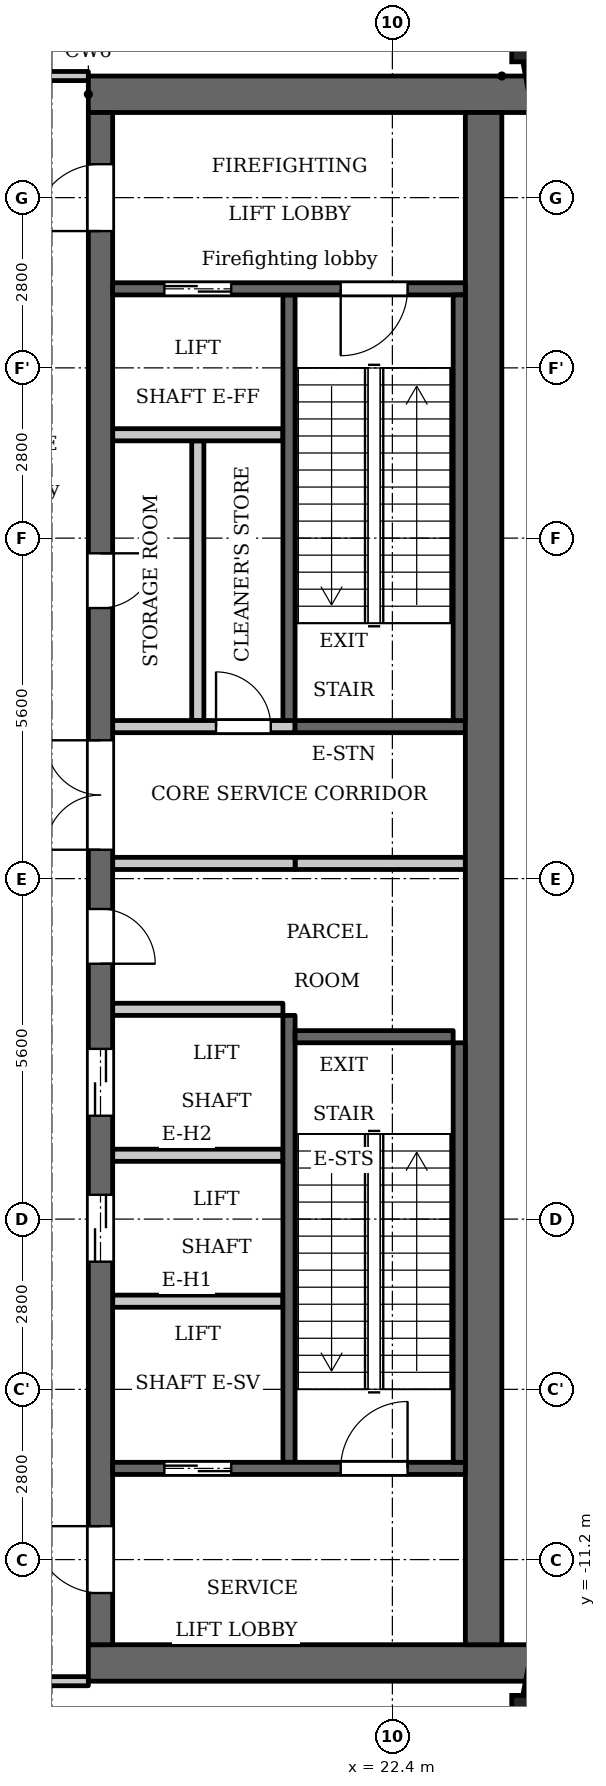
"""IFC4 building model, lengths in metres.
Left out: names, types, materials, properties, quantities, classifications, styles, units other than length and angle.
Written with IfcOpenShell. Run it as: python <this file> out.ifc"""

import sys

from ifc_helpers import new_model, si_unit, direction, frame, frame_2d, origin, origin_2d, place, context, subcontext, project, spatial, rectangle, extrude, element, fill, save


model = new_model("IFC4")
c1 = context("Model", 3, precision=1e-05, world=origin(), true_north=direction((0.0, 1.0)))
c2 = subcontext(c1, "Body", "Model", "MODEL_VIEW")
j1 = project(units=[si_unit("LENGTHUNIT", "METRE"), si_unit("PLANEANGLEUNIT", "RADIAN")], contexts=[c1])
p1 = place(None, origin())
s1 = spatial("IfcSite", under=j1, at=p1, CompositionType="ELEMENT")
p2 = place(p1, origin())
s2 = spatial("IfcBuilding", under=s1, at=p2, CompositionType="ELEMENT")
p3 = place(p2, frame((0.0, 0.0, 289.1)))
s3 = spatial("IfcBuildingStorey", under=s2, at=p3, CompositionType="ELEMENT", Elevation=289.1)
for number, where, z_axis, x_axis in (
    (1, (24.738, -13.809, 0.0), (0.0, 0.0, 1.0), (1.0, 0.0, 0.0)),
    (2, (24.738, 13.809, 0.0), (0.0, 0.0, 1.0), (1.0, 0.0, 0.0)),
):
    element("IfcColumn", number, at=place(p3, frame(where, z_axis=z_axis, x_axis=x_axis)), inside=s3, PredefinedType="COLUMN", context=c2, shape_type="SweptSolid", body=[
        extrude(rectangle(XDim=0.75, YDim=0.75, at=origin_2d()), origin(), (0.0, 0.0, 1.0), 5.4),
    ])
for number, where, z_axis, x_axis in (
    (3, (24.7, -13.42, 0.0), (0.0, 0.0, 1.0), (0.187, 0.982, 0.0)),
    (4, (25.053, 11.572, 0.0), (0.0, 0.0, 1.0), (-0.187, 0.982, 0.0)),
):
    element("IfcWall", number, at=place(p3, frame(where, z_axis=z_axis, x_axis=x_axis)), inside=s3, PredefinedType="SOLIDWALL", context=c2, shape_type="SweptSolid", body=[
        extrude(rectangle(XDim=1.881, YDim=0.3, at=frame_2d((0.941, 0.0))), origin(), (0.0, 0.0, 1.0), 3.2),
    ])
p4 = place(p3, frame((20.7, 2.6, 0.0), z_axis=(0.0, 0.0, 1.0), x_axis=(0.0, 1.0, 0.0)))
e5 = element("IfcWall", 5, at=p4, inside=s3, PredefinedType="SHEAR", context=c2, shape_type="SweptSolid", body=[
    extrude(rectangle(XDim=7.0, YDim=0.2, at=frame_2d((3.5, 0.0))), origin(), (0.0, 0.0, 1.0), 5.0),
])
p5 = place(p3, frame((20.7, -9.6, 0.0), z_axis=(0.0, 0.0, 1.0), x_axis=(0.0, 1.0, 0.0)))
e6 = element("IfcWall", 6, at=p5, inside=s3, PredefinedType="SHEAR", context=c2, shape_type="SweptSolid", body=[
    extrude(rectangle(XDim=7.35, YDim=0.2, at=frame_2d((3.675, 0.0))), origin(), (0.0, 0.0, 1.0), 5.0),
])
p6 = place(p3, frame((20.8, 2.5, 0.0), z_axis=(0.0, 0.0, 1.0), x_axis=(1.0, 0.0, 0.0)))
e7 = element("IfcWall", 7, at=p6, inside=s3, PredefinedType="SHEAR", context=c2, shape_type="SweptSolid", body=[
    extrude(rectangle(XDim=2.8, YDim=0.2, at=frame_2d((1.4, 0.0))), origin(), (0.0, 0.0, 1.0), 5.0),
])
p7 = place(p3, frame((20.8, 0.25, 0.0), z_axis=(0.0, 0.0, 1.0), x_axis=(1.0, 0.0, 0.0)))
e8 = element("IfcWall", 8, at=p7, inside=s3, PredefinedType="PARTITIONING", context=c2, shape_type="SweptSolid", body=[
    extrude(rectangle(XDim=2.8, YDim=0.2, at=frame_2d((1.4, 0.0))), origin(), (0.0, 0.0, 1.0), 5.0),
])
for number, where, z_axis, x_axis in (
    (9, (17.4, 12.9, 0.0), (0.0, 0.0, 1.0), (1.0, 0.0, 0.0)),
    (10, (17.4, -12.9, 0.0), (0.0, 0.0, 1.0), (1.0, 0.0, 0.0)),
):
    element("IfcWall", number, at=place(p3, frame(where, z_axis=z_axis, x_axis=x_axis)), inside=s3, PredefinedType="SHEAR", context=c2, shape_type="SweptSolid", body=[
        extrude(rectangle(XDim=7.32, YDim=0.6, at=frame_2d((3.66, 0.0))), origin(), (0.0, 0.0, 1.0), 5.0),
    ])
p8 = place(p3, frame((19.2, 2.6, 0.0), z_axis=(0.0, 0.0, 1.0), x_axis=(0.0, 1.0, 0.0)))
e11 = element("IfcWall", 11, at=p8, inside=s3, PredefinedType="PARTITIONING", context=c2, shape_type="SweptSolid", body=[
    extrude(rectangle(XDim=4.6, YDim=0.2, at=frame_2d((2.3, 0.0))), origin(), (0.0, 0.0, 1.0), 5.0),
])
p9 = place(p3, frame((17.6, -12.6, 0.0), z_axis=(0.0, 0.0, 1.0), x_axis=(0.0, 1.0, 0.0)))
e12 = element("IfcWall", 12, at=p9, inside=s3, PredefinedType="SHEAR", context=c2, shape_type="SweptSolid", body=[
    extrude(rectangle(XDim=25.2, YDim=0.4, at=frame_2d((12.6, 0.0))), origin(), (0.0, 0.0, 1.0), 5.0),
])
p10 = place(p9, frame((6.3, 0.0, 0.0)))
e13 = element("IfcOpeningElement", 13, at=p10, cuts=e12, PredefinedType="OPENING", context=c2, shape_type="SweptSolid", body=[
    extrude(rectangle(XDim=1.1, YDim=2.1, at=frame_2d((0.55, 1.05))), frame((0.0, 0.21, 0.0), z_axis=(0.0, -1.0, 0.0), x_axis=(1.0, 0.0, 0.0)), (0.0, 0.0, 1.0), 0.42),
])
p11 = place(p9, frame((8.7, 0.0, 0.0)))
e14 = element("IfcOpeningElement", 14, at=p11, cuts=e12, PredefinedType="OPENING", context=c2, shape_type="SweptSolid", body=[
    extrude(rectangle(XDim=1.1, YDim=2.1, at=frame_2d((0.55, 1.05))), frame((0.0, 0.21, 0.0), z_axis=(0.0, -1.0, 0.0), x_axis=(1.0, 0.0, 0.0)), (0.0, 0.0, 1.0), 0.42),
])
p12 = place(p9, frame((11.2, 0.0, 0.0)))
e15 = element("IfcOpeningElement", 15, at=p12, cuts=e12, PredefinedType="OPENING", context=c2, shape_type="SweptSolid", body=[
    extrude(rectangle(XDim=0.9, YDim=2.1, at=frame_2d((0.45, 1.05))), frame((0.0, 0.21, 0.0), z_axis=(0.0, -1.0, 0.0), x_axis=(1.0, 0.0, 0.0)), (0.0, 0.0, 1.0), 0.42),
])
p13 = place(p9, frame((17.05, 0.0, 0.0)))
e16 = element("IfcOpeningElement", 16, at=p13, cuts=e12, PredefinedType="OPENING", context=c2, shape_type="SweptSolid", body=[
    extrude(rectangle(XDim=0.9, YDim=2.1, at=frame_2d((0.45, 1.05))), frame((0.0, 0.21, 0.0), z_axis=(0.0, -1.0, 0.0), x_axis=(1.0, 0.0, 0.0)), (0.0, 0.0, 1.0), 0.42),
])
p14 = place(p9, frame((23.25, 0.0, 0.0)))
e17 = element("IfcOpeningElement", 17, at=p14, cuts=e12, PredefinedType="OPENING", context=c2, shape_type="SweptSolid", body=[
    extrude(rectangle(XDim=1.1, YDim=2.1, at=frame_2d((0.55, 1.05))), frame((0.0, 0.21, 0.0), z_axis=(0.0, -1.0, 0.0), x_axis=(1.0, 0.0, 0.0)), (0.0, 0.0, 1.0), 0.42),
])
p15 = place(p9, frame((0.85, 0.0, 0.0)))
e18 = element("IfcOpeningElement", 18, at=p15, cuts=e12, PredefinedType="OPENING", context=c2, shape_type="SweptSolid", body=[
    extrude(rectangle(XDim=1.1, YDim=2.1, at=frame_2d((0.55, 1.05))), frame((0.0, 0.21, 0.0), z_axis=(0.0, -1.0, 0.0), x_axis=(1.0, 0.0, 0.0)), (0.0, 0.0, 1.0), 0.42),
])
p16 = place(p9, frame((13.075, 0.0, 0.0)))
e19 = element("IfcOpeningElement", 19, at=p16, cuts=e12, PredefinedType="OPENING", context=c2, shape_type="SweptSolid", body=[
    extrude(rectangle(XDim=1.8, YDim=2.1, at=frame_2d((0.9, 1.05))), frame((0.0, 0.21, 0.0), z_axis=(0.0, -1.0, 0.0), x_axis=(1.0, 0.0, 0.0)), (0.0, 0.0, 1.0), 0.42),
])
p17 = place(p3, frame((23.9, -12.6, 0.0), z_axis=(0.0, 0.0, 1.0), x_axis=(0.0, 1.0, 0.0)))
e20 = element("IfcWall", 20, at=p17, inside=s3, PredefinedType="SHEAR", context=c2, shape_type="SweptSolid", body=[
    extrude(rectangle(XDim=25.2, YDim=0.6, at=frame_2d((12.6, 0.0))), origin(), (0.0, 0.0, 1.0), 5.0),
])
p18 = place(p3, frame((17.8, -9.7, 0.0), z_axis=(0.0, 0.0, 1.0), x_axis=(1.0, 0.0, 0.0)))
e21 = element("IfcWall", 21, at=p18, inside=s3, PredefinedType="SHEAR", context=c2, shape_type="SweptSolid", body=[
    extrude(rectangle(XDim=5.8, YDim=0.2, at=frame_2d((2.9, 0.0))), origin(), (0.0, 0.0, 1.0), 5.0),
])
p19 = place(p18, frame((0.85, 0.0, 0.0)))
e22 = element("IfcOpeningElement", 22, at=p19, cuts=e21, PredefinedType="OPENING", context=c2, shape_type="SweptSolid", body=[
    extrude(rectangle(XDim=1.1, YDim=2.1, at=frame_2d((0.55, 1.05))), frame((0.0, 0.11, 0.0), z_axis=(0.0, -1.0, 0.0), x_axis=(1.0, 0.0, 0.0)), (0.0, 0.0, 1.0), 0.22),
])
p20 = place(p18, frame((3.75, 0.0, 0.0)))
e23 = element("IfcOpeningElement", 23, at=p20, cuts=e21, PredefinedType="OPENING", context=c2, shape_type="SweptSolid", body=[
    extrude(rectangle(XDim=1.1, YDim=2.1, at=frame_2d((0.55, 1.05))), frame((0.0, 0.11, 0.0), z_axis=(0.0, -1.0, 0.0), x_axis=(1.0, 0.0, 0.0)), (0.0, 0.0, 1.0), 0.22),
])
for number, where, z_axis, x_axis in (
    (24, (17.8, -6.95, 0.0), (0.0, 0.0, 1.0), (1.0, 0.0, 0.0)),
    (25, (17.8, -4.55, 0.0), (0.0, 0.0, 1.0), (1.0, 0.0, 0.0)),
    (26, (17.8, -2.15, 0.0), (0.0, 0.0, 1.0), (1.0, 0.0, 0.0)),
):
    element("IfcWall", number, at=place(p3, frame(where, z_axis=z_axis, x_axis=x_axis)), inside=s3, PredefinedType="PARTITIONING", context=c2, shape_type="SweptSolid", body=[
        extrude(rectangle(XDim=2.8, YDim=0.2, at=frame_2d((1.4, 0.0))), origin(), (0.0, 0.0, 1.0), 5.0),
    ])
p21 = place(p3, frame((17.8, 0.25, 0.0), z_axis=(0.0, 0.0, 1.0), x_axis=(1.0, 0.0, 0.0)))
e27 = element("IfcWall", 27, at=p21, inside=s3, PredefinedType="PARTITIONING", context=c2, shape_type="SweptSolid", body=[
    extrude(rectangle(XDim=3.0, YDim=0.2, at=frame_2d((1.5, 0.0))), origin(), (0.0, 0.0, 1.0), 5.0),
])
p22 = place(p3, frame((17.8, 2.5, 0.0), z_axis=(0.0, 0.0, 1.0), x_axis=(1.0, 0.0, 0.0)))
e28 = element("IfcWall", 28, at=p22, inside=s3, PredefinedType="PARTITIONING", context=c2, shape_type="SweptSolid", body=[
    extrude(rectangle(XDim=3.0, YDim=0.2, at=frame_2d((1.5, 0.0))), origin(), (0.0, 0.0, 1.0), 5.0),
])
p23 = place(p22, frame((1.7, 0.0, 0.0)))
e29 = element("IfcOpeningElement", 29, at=p23, cuts=e28, PredefinedType="OPENING", context=c2, shape_type="SweptSolid", body=[
    extrude(rectangle(XDim=0.9, YDim=2.1, at=frame_2d((0.45, 1.05))), frame((0.0, 0.11, 0.0), z_axis=(0.0, -1.0, 0.0), x_axis=(1.0, 0.0, 0.0)), (0.0, 0.0, 1.0), 0.22),
])
p24 = place(p3, frame((17.8, 7.3, 0.0), z_axis=(0.0, 0.0, 1.0), x_axis=(1.0, 0.0, 0.0)))
e30 = element("IfcWall", 30, at=p24, inside=s3, PredefinedType="PARTITIONING", context=c2, shape_type="SweptSolid", body=[
    extrude(rectangle(XDim=2.8, YDim=0.2, at=frame_2d((1.4, 0.0))), origin(), (0.0, 0.0, 1.0), 5.0),
])
p25 = place(p3, frame((17.8, 9.7, 0.0), z_axis=(0.0, 0.0, 1.0), x_axis=(1.0, 0.0, 0.0)))
e31 = element("IfcWall", 31, at=p25, inside=s3, PredefinedType="SHEAR", context=c2, shape_type="SweptSolid", body=[
    extrude(rectangle(XDim=5.8, YDim=0.2, at=frame_2d((2.9, 0.0))), origin(), (0.0, 0.0, 1.0), 5.0),
])
p26 = place(p25, frame((0.85, 0.0, 0.0)))
e32 = element("IfcOpeningElement", 32, at=p26, cuts=e31, PredefinedType="OPENING", context=c2, shape_type="SweptSolid", body=[
    extrude(rectangle(XDim=1.1, YDim=2.1, at=frame_2d((0.55, 1.05))), frame((0.0, 0.11, 0.0), z_axis=(0.0, -1.0, 0.0), x_axis=(1.0, 0.0, 0.0)), (0.0, 0.0, 1.0), 0.22),
])
p27 = place(p25, frame((3.75, 0.0, 0.0)))
e33 = element("IfcOpeningElement", 33, at=p27, cuts=e31, PredefinedType="OPENING", context=c2, shape_type="SweptSolid", body=[
    extrude(rectangle(XDim=1.1, YDim=2.1, at=frame_2d((0.55, 1.05))), frame((0.0, 0.11, 0.0), z_axis=(0.0, -1.0, 0.0), x_axis=(1.0, 0.0, 0.0)), (0.0, 0.0, 1.0), 0.22),
])
p28 = place(p3, frame((23.5, 2.6, 0.0), z_axis=(0.0, 0.0, 1.0), x_axis=(0.0, 1.0, 0.0)))
e34 = element("IfcWall", 34, at=p28, inside=s3, PredefinedType="SHEAR", context=c2, shape_type="SweptSolid", body=[
    extrude(rectangle(XDim=7.0, YDim=0.2, at=frame_2d((3.5, 0.0))), origin(), (0.0, 0.0, 1.0), 5.0),
])
p29 = place(p3, frame((23.5, -9.6, 0.0), z_axis=(0.0, 0.0, 1.0), x_axis=(0.0, 1.0, 0.0)))
e35 = element("IfcWall", 35, at=p29, inside=s3, PredefinedType="SHEAR", context=c2, shape_type="SweptSolid", body=[
    extrude(rectangle(XDim=6.9, YDim=0.2, at=frame_2d((3.45, 0.0))), origin(), (0.0, 0.0, 1.0), 5.0),
])
p30 = place(p3, frame((20.8, -2.6, 0.0), z_axis=(0.0, 0.0, 1.0), x_axis=(1.0, 0.0, 0.0)))
e36 = element("IfcWall", 36, at=p30, inside=s3, PredefinedType="SHEAR", context=c2, shape_type="SweptSolid", body=[
    extrude(rectangle(XDim=2.6, YDim=0.2, at=frame_2d((1.3, 0.0))), origin(), (0.0, 0.0, 1.0), 5.0),
])
p31 = place(p3, frame((-17.4, -13.2, 0.0), z_axis=(0.0, 0.0, 1.0), x_axis=(1.0, 0.0, 0.0)))
e37 = element("IfcWall", 37, at=p31, inside=s3, PredefinedType="PARTITIONING", context=c2, shape_type="SweptSolid", body=[
    extrude(rectangle(XDim=34.8, YDim=0.15, at=frame_2d((17.4, 0.0))), origin(), (0.0, 0.0, 1.0), 5.0),
])
p32 = place(p31, frame((0.65, 0.0, 0.0)))
e38 = element("IfcOpeningElement", 38, at=p32, cuts=e37, PredefinedType="OPENING", context=c2, shape_type="SweptSolid", body=[
    extrude(rectangle(XDim=1.0, YDim=2.1, at=frame_2d((0.5, 1.05))), frame((0.0, 0.085, 0.0), z_axis=(0.0, -1.0, 0.0), x_axis=(1.0, 0.0, 0.0)), (0.0, 0.0, 1.0), 0.17),
])
p33 = place(p31, frame((33.05, 0.0, 0.0)))
e39 = element("IfcOpeningElement", 39, at=p33, cuts=e37, PredefinedType="OPENING", context=c2, shape_type="SweptSolid", body=[
    extrude(rectangle(XDim=1.0, YDim=2.1, at=frame_2d((0.5, 1.05))), frame((0.0, 0.085, 0.0), z_axis=(0.0, -1.0, 0.0), x_axis=(1.0, 0.0, 0.0)), (0.0, 0.0, 1.0), 0.17),
])
p34 = place(p31, frame((6.75, 0.0, 0.0)))
e40 = element("IfcOpeningElement", 40, at=p34, cuts=e37, PredefinedType="OPENING", context=c2, shape_type="SweptSolid", body=[
    extrude(rectangle(XDim=1.0, YDim=2.1, at=frame_2d((0.5, 1.05))), frame((0.0, 0.085, 0.0), z_axis=(0.0, -1.0, 0.0), x_axis=(1.0, 0.0, 0.0)), (0.0, 0.0, 1.0), 0.17),
])
p35 = place(p31, frame((9.0, 0.0, 0.0)))
e41 = element("IfcOpeningElement", 41, at=p35, cuts=e37, PredefinedType="OPENING", context=c2, shape_type="SweptSolid", body=[
    extrude(rectangle(XDim=1.0, YDim=2.1, at=frame_2d((0.5, 1.05))), frame((0.0, 0.085, 0.0), z_axis=(0.0, -1.0, 0.0), x_axis=(1.0, 0.0, 0.0)), (0.0, 0.0, 1.0), 0.17),
])
p36 = place(p31, frame((30.55, 0.0, 0.0)))
e42 = element("IfcOpeningElement", 42, at=p36, cuts=e37, PredefinedType="OPENING", context=c2, shape_type="SweptSolid", body=[
    extrude(rectangle(XDim=1.2, YDim=2.1, at=frame_2d((0.6, 1.05))), frame((0.0, 0.085, 0.0), z_axis=(0.0, -1.0, 0.0), x_axis=(1.0, 0.0, 0.0)), (0.0, 0.0, 1.0), 0.17),
])
p37 = place(p3, frame((-17.4, 13.2, 0.0), z_axis=(0.0, 0.0, 1.0), x_axis=(1.0, 0.0, 0.0)))
e43 = element("IfcWall", 43, at=p37, inside=s3, PredefinedType="PARTITIONING", context=c2, shape_type="SweptSolid", body=[
    extrude(rectangle(XDim=34.8, YDim=0.15, at=frame_2d((17.4, 0.0))), origin(), (0.0, 0.0, 1.0), 5.0),
])
p38 = place(p37, frame((0.75, 0.0, 0.0)))
e44 = element("IfcOpeningElement", 44, at=p38, cuts=e43, PredefinedType="OPENING", context=c2, shape_type="SweptSolid", body=[
    extrude(rectangle(XDim=1.0, YDim=2.1, at=frame_2d((0.5, 1.05))), frame((0.0, 0.085, 0.0), z_axis=(0.0, -1.0, 0.0), x_axis=(1.0, 0.0, 0.0)), (0.0, 0.0, 1.0), 0.17),
])
p39 = place(p37, frame((33.15, 0.0, 0.0)))
e45 = element("IfcOpeningElement", 45, at=p39, cuts=e43, PredefinedType="OPENING", context=c2, shape_type="SweptSolid", body=[
    extrude(rectangle(XDim=1.0, YDim=2.1, at=frame_2d((0.5, 1.05))), frame((0.0, 0.085, 0.0), z_axis=(0.0, -1.0, 0.0), x_axis=(1.0, 0.0, 0.0)), (0.0, 0.0, 1.0), 0.17),
])
p40 = place(p37, frame((3.05, 0.0, 0.0)))
e46 = element("IfcOpeningElement", 46, at=p40, cuts=e43, PredefinedType="OPENING", context=c2, shape_type="SweptSolid", body=[
    extrude(rectangle(XDim=1.2, YDim=2.1, at=frame_2d((0.6, 1.05))), frame((0.0, 0.085, 0.0), z_axis=(0.0, -1.0, 0.0), x_axis=(1.0, 0.0, 0.0)), (0.0, 0.0, 1.0), 0.17),
])
p41 = place(p37, frame((30.8, 0.0, 0.0)))
e47 = element("IfcOpeningElement", 47, at=p41, cuts=e43, PredefinedType="OPENING", context=c2, shape_type="SweptSolid", body=[
    extrude(rectangle(XDim=1.0, YDim=2.1, at=frame_2d((0.5, 1.05))), frame((0.0, 0.085, 0.0), z_axis=(0.0, -1.0, 0.0), x_axis=(1.0, 0.0, 0.0)), (0.0, 0.0, 1.0), 0.17),
])
p42 = place(p19, origin())
e48 = element("IfcDoor", 48, at=p42, inside=s3, OperationType="DOUBLE_DOOR_SLIDING", PredefinedType="DOOR", context=c2, shape_type="SweptSolid", body=[
    extrude(rectangle(XDim=1.1, YDim=2.1, at=frame_2d((0.55, 1.05))), frame((0.0, 0.025, 0.0), z_axis=(0.0, -1.0, 0.0), x_axis=(1.0, 0.0, 0.0)), (0.0, 0.0, 1.0), 0.05),
])
fill(e22, e48)
p43 = place(p10, origin())
e49 = element("IfcDoor", 49, at=p43, inside=s3, OperationType="DOUBLE_DOOR_SLIDING", PredefinedType="DOOR", context=c2, shape_type="SweptSolid", body=[
    extrude(rectangle(XDim=1.1, YDim=2.1, at=frame_2d((0.55, 1.05))), frame((0.0, 0.025, 0.0), z_axis=(0.0, -1.0, 0.0), x_axis=(1.0, 0.0, 0.0)), (0.0, 0.0, 1.0), 0.05),
])
fill(e13, e49)
p44 = place(p11, origin())
e50 = element("IfcDoor", 50, at=p44, inside=s3, OperationType="DOUBLE_DOOR_SLIDING", PredefinedType="DOOR", context=c2, shape_type="SweptSolid", body=[
    extrude(rectangle(XDim=1.1, YDim=2.1, at=frame_2d((0.55, 1.05))), frame((0.0, 0.025, 0.0), z_axis=(0.0, -1.0, 0.0), x_axis=(1.0, 0.0, 0.0)), (0.0, 0.0, 1.0), 0.05),
])
fill(e14, e50)
p45 = place(p12, origin())
e51 = element("IfcDoor", 51, at=p45, inside=s3, OperationType="SINGLE_SWING_LEFT", PredefinedType="DOOR", context=c2, shape_type="SweptSolid", body=[
    extrude(rectangle(XDim=0.9, YDim=2.1, at=frame_2d((0.45, 1.05))), frame((0.0, 0.025, 0.0), z_axis=(0.0, -1.0, 0.0), x_axis=(1.0, 0.0, 0.0)), (0.0, 0.0, 1.0), 0.05),
])
fill(e15, e51)
p46 = place(p13, origin())
e52 = element("IfcDoor", 52, at=p46, inside=s3, OperationType="SINGLE_SWING_RIGHT", PredefinedType="DOOR", context=c2, shape_type="SweptSolid", body=[
    extrude(rectangle(XDim=0.9, YDim=2.1, at=frame_2d((0.45, 1.05))), frame((0.0, 0.025, 0.0), z_axis=(0.0, -1.0, 0.0), x_axis=(1.0, 0.0, 0.0)), (0.0, 0.0, 1.0), 0.05),
])
fill(e16, e52)
p47 = place(p23, origin())
e53 = element("IfcDoor", 53, at=p47, inside=s3, OperationType="SINGLE_SWING_RIGHT", PredefinedType="DOOR", context=c2, shape_type="SweptSolid", body=[
    extrude(rectangle(XDim=0.9, YDim=2.1, at=frame_2d((0.45, 1.05))), frame((0.0, 0.025, 0.0), z_axis=(0.0, -1.0, 0.0), x_axis=(1.0, 0.0, 0.0)), (0.0, 0.0, 1.0), 0.05),
])
fill(e29, e53)
p48 = place(p26, origin())
e54 = element("IfcDoor", 54, at=p48, inside=s3, OperationType="DOUBLE_DOOR_SLIDING", PredefinedType="DOOR", context=c2, shape_type="SweptSolid", body=[
    extrude(rectangle(XDim=1.1, YDim=2.1, at=frame_2d((0.55, 1.05))), frame((0.0, 0.025, 0.0), z_axis=(0.0, -1.0, 0.0), x_axis=(1.0, 0.0, 0.0)), (0.0, 0.0, 1.0), 0.05),
])
fill(e32, e54)
p49 = place(p14, origin())
e55 = element("IfcDoor", 55, at=p49, inside=s3, OperationType="SINGLE_SWING_RIGHT", PredefinedType="DOOR", context=c2, shape_type="SweptSolid", body=[
    extrude(rectangle(XDim=1.1, YDim=2.1, at=frame_2d((0.55, 1.05))), frame((0.0, 0.025, 0.0), z_axis=(0.0, -1.0, 0.0), x_axis=(1.0, 0.0, 0.0)), (0.0, 0.0, 1.0), 0.05),
])
fill(e17, e55)
p50 = place(p15, origin())
e56 = element("IfcDoor", 56, at=p50, inside=s3, OperationType="SINGLE_SWING_LEFT", PredefinedType="DOOR", context=c2, shape_type="SweptSolid", body=[
    extrude(rectangle(XDim=1.1, YDim=2.1, at=frame_2d((0.55, 1.05))), frame((0.0, 0.025, 0.0), z_axis=(0.0, -1.0, 0.0), x_axis=(1.0, 0.0, 0.0)), (0.0, 0.0, 1.0), 0.05),
])
fill(e18, e56)
p51 = place(p27, origin())
e57 = element("IfcDoor", 57, at=p51, inside=s3, OperationType="SINGLE_SWING_LEFT", PredefinedType="DOOR", context=c2, shape_type="SweptSolid", body=[
    extrude(rectangle(XDim=1.1, YDim=2.1, at=frame_2d((0.55, 1.05))), frame((0.0, 0.025, 0.0), z_axis=(0.0, -1.0, 0.0), x_axis=(1.0, 0.0, 0.0)), (0.0, 0.0, 1.0), 0.05),
])
fill(e33, e57)
p52 = place(p20, origin())
e58 = element("IfcDoor", 58, at=p52, inside=s3, OperationType="SINGLE_SWING_LEFT", PredefinedType="DOOR", context=c2, shape_type="SweptSolid", body=[
    extrude(rectangle(XDim=1.1, YDim=2.1, at=frame_2d((0.55, 1.05))), frame((0.0, 0.025, 0.0), z_axis=(0.0, -1.0, 0.0), x_axis=(1.0, 0.0, 0.0)), (0.0, 0.0, 1.0), 0.05),
])
fill(e23, e58)
p53 = place(p16, origin())
e59 = element("IfcDoor", 59, at=p53, inside=s3, OperationType="DOUBLE_DOOR_SINGLE_SWING", PredefinedType="DOOR", context=c2, shape_type="SweptSolid", body=[
    extrude(rectangle(XDim=1.8, YDim=2.1, at=frame_2d((0.9, 1.05))), frame((0.0, 0.025, 0.0), z_axis=(0.0, -1.0, 0.0), x_axis=(1.0, 0.0, 0.0)), (0.0, 0.0, 1.0), 0.05),
])
fill(e19, e59)
save(model, sys.argv[1])
